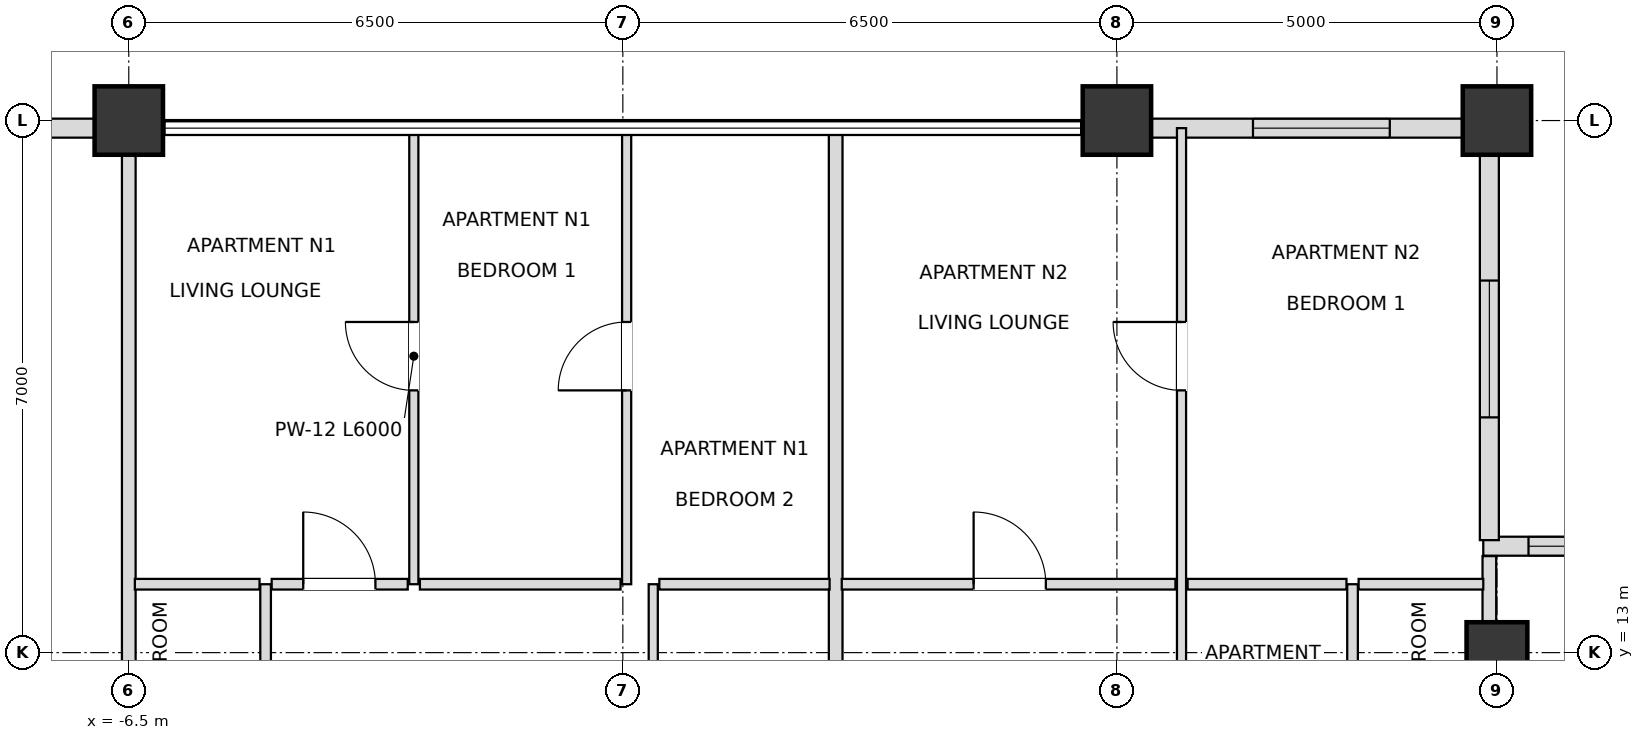
"""IFC4 building model, lengths in metres.
Left out: names, types, materials, properties, quantities, classifications, styles, units other than length and angle.
Written with IfcOpenShell. Run it as: python <this file> out.ifc"""

import sys

from ifc_helpers import new_model, si_unit, direction, frame, frame_2d, origin, origin_2d, place, context, subcontext, project, spatial, rectangle, extrude, element, fill, save


model = new_model("IFC4")
c1 = context("Model", 3, precision=1e-05, world=origin(), true_north=direction((0.0, 1.0)))
c2 = subcontext(c1, "Body", "Model", "MODEL_VIEW")
j1 = project(units=[si_unit("LENGTHUNIT", "METRE"), si_unit("PLANEANGLEUNIT", "RADIAN")], contexts=[c1])
p1 = place(None, origin())
s1 = spatial("IfcSite", under=j1, at=p1, CompositionType="ELEMENT")
p2 = place(p1, origin())
s2 = spatial("IfcBuilding", under=s1, at=p2, CompositionType="ELEMENT")
p3 = place(p2, frame((0.0, 0.0, 233.1)))
s3 = spatial("IfcBuildingStorey", under=s2, at=p3, CompositionType="ELEMENT", Elevation=233.1)
for number, where, z_axis, x_axis in (
    (1, (11.5, 20.0, 0.0), (0.0, 0.0, 1.0), (1.0, 0.0, 0.0)),
    (2, (6.5, 20.0, 0.0), (0.0, 0.0, 1.0), (1.0, 0.0, 0.0)),
    (3, (-6.5, 20.0, 0.0), (0.0, 0.0, 1.0), (1.0, 0.0, 0.0)),
):
    element("IfcColumn", number, at=place(p3, frame(where, z_axis=z_axis, x_axis=x_axis)), inside=s3, PredefinedType="USERDEFINED", context=c2, shape_type="SweptSolid", body=[
        extrude(rectangle(XDim=0.9, YDim=0.9, at=origin_2d()), origin(), (0.0, 0.0, 1.0), 3.6),
    ])
p4 = place(p3, frame((11.5, 13.0, 0.0), z_axis=(0.0, 0.0, 1.0), x_axis=(1.0, 0.0, 0.0)))
e4 = element("IfcColumn", 4, at=p4, inside=s3, PredefinedType="COLUMN", context=c2, shape_type="SweptSolid", body=[
    extrude(rectangle(XDim=0.8, YDim=0.8, at=origin_2d()), origin(), (0.0, 0.0, 1.0), 3.6),
])
p5 = place(p3, frame((11.055, 19.9, 0.0), z_axis=(0.0, 0.0, 1.0), x_axis=(-1.0, 0.0, 0.0)))
e5 = element("IfcWall", 5, at=p5, inside=s3, PredefinedType="SOLIDWALL", context=c2, shape_type="SweptSolid", body=[
    extrude(rectangle(XDim=4.11, YDim=0.25, at=frame_2d((2.055, 0.0))), origin(), (0.0, 0.0, 1.0), 2.748),
])
p6 = place(p5, frame((0.965, 0.0, 0.72)))
e6 = element("IfcOpeningElement", 6, at=p6, cuts=e5, PredefinedType="OPENING", context=c2, shape_type="SweptSolid", body=[
    extrude(rectangle(XDim=1.8, YDim=1.68, at=frame_2d((0.9, 0.84))), frame((0.0, 0.135, 0.0), z_axis=(0.0, -1.0, 0.0), x_axis=(1.0, 0.0, 0.0)), (0.0, 0.0, 1.0), 0.27),
])
p7 = place(p3, frame((-6.945, 19.9, 0.0), z_axis=(0.0, 0.0, 1.0), x_axis=(-1.0, 0.0, 0.0)))
e7 = element("IfcWall", 7, at=p7, inside=s3, PredefinedType="SOLIDWALL", context=c2, shape_type="SweptSolid", body=[
    extrude(rectangle(XDim=4.11, YDim=0.25, at=frame_2d((2.055, 0.0))), origin(), (0.0, 0.0, 1.0), 2.748),
])
p8 = place(p7, frame((1.155, 0.0, 0.72)))
e8 = element("IfcOpeningElement", 8, at=p8, cuts=e7, PredefinedType="OPENING", context=c2, shape_type="SweptSolid", body=[
    extrude(rectangle(XDim=1.8, YDim=1.68, at=frame_2d((0.9, 0.84))), frame((0.0, 0.135, 0.0), z_axis=(0.0, -1.0, 0.0), x_axis=(1.0, 0.0, 0.0)), (0.0, 0.0, 1.0), 0.27),
])
p9 = place(p3, frame((16.98, 14.4, 0.0), z_axis=(0.0, 0.0, 1.0), x_axis=(-1.0, 0.0, 0.0)))
e9 = element("IfcWall", 9, at=p9, inside=s3, PredefinedType="SOLIDWALL", context=c2, shape_type="SweptSolid", body=[
    extrude(rectangle(XDim=5.66, YDim=0.25, at=frame_2d((2.83, 0.0))), origin(), (0.0, 0.0, 1.0), 2.748),
])
p10 = place(p9, frame((0.595, 0.0, 0.72)))
e10 = element("IfcOpeningElement", 10, at=p10, cuts=e9, PredefinedType="OPENING", context=c2, shape_type="SweptSolid", body=[
    extrude(rectangle(XDim=1.8, YDim=1.68, at=frame_2d((0.9, 0.84))), frame((0.0, 0.135, 0.0), z_axis=(0.0, -1.0, 0.0), x_axis=(1.0, 0.0, 0.0)), (0.0, 0.0, 1.0), 0.27),
])
p11 = place(p9, frame((3.265, 0.0, 0.72)))
e11 = element("IfcOpeningElement", 11, at=p11, cuts=e9, PredefinedType="OPENING", context=c2, shape_type="SweptSolid", body=[
    extrude(rectangle(XDim=1.8, YDim=1.68, at=frame_2d((0.9, 0.84))), frame((0.0, 0.135, 0.0), z_axis=(0.0, -1.0, 0.0), x_axis=(1.0, 0.0, 0.0)), (0.0, 0.0, 1.0), 0.27),
])
p12 = place(p3, frame((11.4, 14.48, 0.0), z_axis=(0.0, 0.0, 1.0), x_axis=(0.0, 1.0, 0.0)))
e12 = element("IfcWall", 12, at=p12, inside=s3, PredefinedType="SOLIDWALL", context=c2, shape_type="SweptSolid", body=[
    extrude(rectangle(XDim=5.34, YDim=0.25, at=frame_2d((2.67, 0.0))), origin(), (0.0, 0.0, 1.0), 2.748),
])
p13 = place(p12, frame((1.615, 0.0, 0.72)))
e13 = element("IfcOpeningElement", 13, at=p13, cuts=e12, PredefinedType="OPENING", context=c2, shape_type="SweptSolid", body=[
    extrude(rectangle(XDim=1.8, YDim=1.68, at=frame_2d((0.9, 0.84))), frame((0.0, 0.135, 0.0), z_axis=(0.0, -1.0, 0.0), x_axis=(1.0, 0.0, 0.0)), (0.0, 0.0, 1.0), 0.27),
])
p14 = place(p3, frame((-6.5, 9.2, 0.0), z_axis=(0.0, 0.0, 1.0), x_axis=(0.0, 1.0, 0.0)))
e14 = element("IfcWall", 14, at=p14, inside=s3, PredefinedType="PARTITIONING", context=c2, shape_type="SweptSolid", body=[
    extrude(rectangle(XDim=10.7, YDim=0.18, at=frame_2d((5.35, 0.0))), origin(), (0.0, 0.0, 1.0), 2.826),
])
p15 = place(p3, frame((-4.7, 9.2, 0.0), z_axis=(0.0, 0.0, 1.0), x_axis=(0.0, 1.0, 0.0)))
e15 = element("IfcWall", 15, at=p15, inside=s3, PredefinedType="PARTITIONING", context=c2, shape_type="SweptSolid", body=[
    extrude(rectangle(XDim=4.7, YDim=0.14, at=frame_2d((2.35, 0.0))), origin(), (0.0, 0.0, 1.0), 3.38),
])
p16 = place(p15, frame((1.9, 0.0, 0.0)))
e16 = element("IfcOpeningElement", 16, at=p16, cuts=e15, PredefinedType="OPENING", context=c2, shape_type="SweptSolid", body=[
    extrude(rectangle(XDim=0.9, YDim=2.1, at=frame_2d((0.45, 1.05))), frame((0.0, 0.08, 0.0), z_axis=(0.0, -1.0, 0.0), x_axis=(1.0, 0.0, 0.0)), (0.0, 0.0, 1.0), 0.16),
])
p17 = place(p3, frame((-2.75, 13.9, 0.0), z_axis=(0.0, 0.0, 1.0), x_axis=(0.0, 1.0, 0.0)))
e17 = element("IfcWall", 17, at=p17, inside=s3, PredefinedType="PARTITIONING", context=c2, shape_type="SweptSolid", body=[
    extrude(rectangle(XDim=6.0, YDim=0.12, at=frame_2d((3.0, 0.0))), origin(), (0.0, 0.0, 1.0), 3.018),
])
p18 = place(p17, frame((2.55, 0.0, 0.0)))
e18 = element("IfcOpeningElement", 18, at=p18, cuts=e17, PredefinedType="OPENING", context=c2, shape_type="SweptSolid", body=[
    extrude(rectangle(XDim=0.9, YDim=2.1, at=frame_2d((0.45, 1.05))), frame((0.0, 0.07, 0.0), z_axis=(0.0, -1.0, 0.0), x_axis=(1.0, 0.0, 0.0)), (0.0, 0.0, 1.0), 0.14),
])
p19 = place(p3, frame((0.05, 13.9, 0.0), z_axis=(0.0, 0.0, 1.0), x_axis=(0.0, 1.0, 0.0)))
e19 = element("IfcWall", 19, at=p19, inside=s3, PredefinedType="PARTITIONING", context=c2, shape_type="SweptSolid", body=[
    extrude(rectangle(XDim=6.0, YDim=0.12, at=frame_2d((3.0, 0.0))), origin(), (0.0, 0.0, 1.0), 3.018),
])
p20 = place(p19, frame((2.55, 0.0, 0.0)))
e20 = element("IfcOpeningElement", 20, at=p20, cuts=e19, PredefinedType="OPENING", context=c2, shape_type="SweptSolid", body=[
    extrude(rectangle(XDim=0.9, YDim=2.1, at=frame_2d((0.45, 1.05))), frame((0.0, 0.07, 0.0), z_axis=(0.0, -1.0, 0.0), x_axis=(1.0, 0.0, 0.0)), (0.0, 0.0, 1.0), 0.14),
])
p21 = place(p3, frame((0.4, 9.2, 0.0), z_axis=(0.0, 0.0, 1.0), x_axis=(0.0, 1.0, 0.0)))
e21 = element("IfcWall", 21, at=p21, inside=s3, PredefinedType="PARTITIONING", context=c2, shape_type="SweptSolid", body=[
    extrude(rectangle(XDim=4.7, YDim=0.12, at=frame_2d((2.35, 0.0))), origin(), (0.0, 0.0, 1.0), 3.38),
])
p22 = place(p21, frame((1.875, 0.0, 0.0)))
e22 = element("IfcOpeningElement", 22, at=p22, cuts=e21, PredefinedType="OPENING", context=c2, shape_type="SweptSolid", body=[
    extrude(rectangle(XDim=0.95, YDim=2.1, at=frame_2d((0.475, 1.05))), frame((0.0, 0.07, 0.0), z_axis=(0.0, -1.0, 0.0), x_axis=(1.0, 0.0, 0.0)), (0.0, 0.0, 1.0), 0.14),
])
p23 = place(p3, frame((2.8, 9.2, 0.0), z_axis=(0.0, 0.0, 1.0), x_axis=(0.0, 1.0, 0.0)))
e23 = element("IfcWall", 23, at=p23, inside=s3, PredefinedType="PARTITIONING", context=c2, shape_type="SweptSolid", body=[
    extrude(rectangle(XDim=10.7, YDim=0.18, at=frame_2d((5.35, 0.0))), origin(), (0.0, 0.0, 1.0), 3.018),
])
p24 = place(p3, frame((7.35, 9.2, 0.0), z_axis=(0.0, 0.0, 1.0), x_axis=(0.0, 1.0, 0.0)))
e24 = element("IfcWall", 24, at=p24, inside=s3, PredefinedType="PARTITIONING", context=c2, shape_type="SweptSolid", body=[
    extrude(rectangle(XDim=10.7, YDim=0.12, at=frame_2d((5.35, 0.0))), origin(), (0.0, 0.0, 1.0), 2.826),
])
p25 = place(p24, frame((1.875, 0.0, 0.0)))
e25 = element("IfcOpeningElement", 25, at=p25, cuts=e24, PredefinedType="OPENING", context=c2, shape_type="SweptSolid", body=[
    extrude(rectangle(XDim=0.95, YDim=2.1, at=frame_2d((0.475, 1.05))), frame((0.0, 0.07, 0.0), z_axis=(0.0, -1.0, 0.0), x_axis=(1.0, 0.0, 0.0)), (0.0, 0.0, 1.0), 0.14),
])
p26 = place(p24, frame((7.25, 0.0, 0.0)))
e26 = element("IfcOpeningElement", 26, at=p26, cuts=e24, PredefinedType="OPENING", context=c2, shape_type="SweptSolid", body=[
    extrude(rectangle(XDim=0.9, YDim=2.1, at=frame_2d((0.45, 1.05))), frame((0.0, 0.07, 0.0), z_axis=(0.0, -1.0, 0.0), x_axis=(1.0, 0.0, 0.0)), (0.0, 0.0, 1.0), 0.14),
])
p27 = place(p3, frame((9.6, 9.2, 0.0), z_axis=(0.0, 0.0, 1.0), x_axis=(0.0, 1.0, 0.0)))
e27 = element("IfcWall", 27, at=p27, inside=s3, PredefinedType="PARTITIONING", context=c2, shape_type="SweptSolid", body=[
    extrude(rectangle(XDim=4.7, YDim=0.14, at=frame_2d((2.35, 0.0))), origin(), (0.0, 0.0, 1.0), 2.826),
])
p28 = place(p27, frame((1.9, 0.0, 0.0)))
e28 = element("IfcOpeningElement", 28, at=p28, cuts=e27, PredefinedType="OPENING", context=c2, shape_type="SweptSolid", body=[
    extrude(rectangle(XDim=0.9, YDim=2.1, at=frame_2d((0.45, 1.05))), frame((0.0, 0.08, 0.0), z_axis=(0.0, -1.0, 0.0), x_axis=(1.0, 0.0, 0.0)), (0.0, 0.0, 1.0), 0.16),
])
p29 = place(p3, frame((11.4, 9.2, 0.0), z_axis=(0.0, 0.0, 1.0), x_axis=(0.0, 1.0, 0.0)))
e29 = element("IfcWall", 29, at=p29, inside=s3, PredefinedType="PARTITIONING", context=c2, shape_type="SweptSolid", body=[
    extrude(rectangle(XDim=5.07, YDim=0.18, at=frame_2d((2.535, 0.0))), origin(), (0.0, 0.0, 1.0), 2.748),
])
p30 = place(p3, frame((-6.42, 13.9, 0.0), z_axis=(0.0, 0.0, 1.0), x_axis=(1.0, 0.0, 0.0)))
e30 = element("IfcWall", 30, at=p30, inside=s3, PredefinedType="PARTITIONING", context=c2, shape_type="SweptSolid", body=[
    extrude(rectangle(XDim=1.64, YDim=0.14, at=frame_2d((0.82, 0.0))), origin(), (0.0, 0.0, 1.0), 3.38),
])
p31 = place(p3, frame((-4.62, 13.9, 0.0), z_axis=(0.0, 0.0, 1.0), x_axis=(1.0, 0.0, 0.0)))
e31 = element("IfcWall", 31, at=p31, inside=s3, PredefinedType="PARTITIONING", context=c2, shape_type="SweptSolid", body=[
    extrude(rectangle(XDim=1.79, YDim=0.14, at=frame_2d((0.895, 0.0))), origin(), (0.0, 0.0, 1.0), 3.38),
])
p32 = place(p31, frame((0.415, 0.0, 0.0)))
e32 = element("IfcOpeningElement", 32, at=p32, cuts=e31, PredefinedType="OPENING", context=c2, shape_type="SweptSolid", body=[
    extrude(rectangle(XDim=0.95, YDim=2.1, at=frame_2d((0.475, 1.05))), frame((0.0, 0.08, 0.0), z_axis=(0.0, -1.0, 0.0), x_axis=(1.0, 0.0, 0.0)), (0.0, 0.0, 1.0), 0.16),
])
p33 = place(p3, frame((-2.67, 13.9, 0.0), z_axis=(0.0, 0.0, 1.0), x_axis=(1.0, 0.0, 0.0)))
e33 = element("IfcWall", 33, at=p33, inside=s3, PredefinedType="PARTITIONING", context=c2, shape_type="SweptSolid", body=[
    extrude(rectangle(XDim=2.64, YDim=0.14, at=frame_2d((1.32, 0.0))), origin(), (0.0, 0.0, 1.0), 3.38),
])
p34 = place(p3, frame((0.48, 13.9, 0.0), z_axis=(0.0, 0.0, 1.0), x_axis=(1.0, 0.0, 0.0)))
e34 = element("IfcWall", 34, at=p34, inside=s3, PredefinedType="PARTITIONING", context=c2, shape_type="SweptSolid", body=[
    extrude(rectangle(XDim=2.24, YDim=0.14, at=frame_2d((1.12, 0.0))), origin(), (0.0, 0.0, 1.0), 3.38),
])
p35 = place(p3, frame((2.88, 13.9, 0.0), z_axis=(0.0, 0.0, 1.0), x_axis=(1.0, 0.0, 0.0)))
e35 = element("IfcWall", 35, at=p35, inside=s3, PredefinedType="PARTITIONING", context=c2, shape_type="SweptSolid", body=[
    extrude(rectangle(XDim=4.39, YDim=0.14, at=frame_2d((2.195, 0.0))), origin(), (0.0, 0.0, 1.0), 2.826),
])
p36 = place(p35, frame((1.735, 0.0, 0.0)))
e36 = element("IfcOpeningElement", 36, at=p36, cuts=e35, PredefinedType="OPENING", context=c2, shape_type="SweptSolid", body=[
    extrude(rectangle(XDim=0.95, YDim=2.1, at=frame_2d((0.475, 1.05))), frame((0.0, 0.08, 0.0), z_axis=(0.0, -1.0, 0.0), x_axis=(1.0, 0.0, 0.0)), (0.0, 0.0, 1.0), 0.16),
])
p37 = place(p3, frame((7.43, 13.9, 0.0), z_axis=(0.0, 0.0, 1.0), x_axis=(1.0, 0.0, 0.0)))
e37 = element("IfcWall", 37, at=p37, inside=s3, PredefinedType="PARTITIONING", context=c2, shape_type="SweptSolid", body=[
    extrude(rectangle(XDim=2.09, YDim=0.14, at=frame_2d((1.045, 0.0))), origin(), (0.0, 0.0, 1.0), 3.38),
])
p38 = place(p3, frame((9.68, 13.9, 0.0), z_axis=(0.0, 0.0, 1.0), x_axis=(1.0, 0.0, 0.0)))
e38 = element("IfcWall", 38, at=p38, inside=s3, PredefinedType="PARTITIONING", context=c2, shape_type="SweptSolid", body=[
    extrude(rectangle(XDim=1.64, YDim=0.14, at=frame_2d((0.82, 0.0))), origin(), (0.0, 0.0, 1.0), 3.38),
])
p39 = place(p6, origin())
e39 = element("IfcWindow", 39, at=p39, inside=s3, PartitioningType="SINGLE_PANEL", PredefinedType="WINDOW", context=c2, shape_type="SweptSolid", body=[
    extrude(rectangle(XDim=1.8, YDim=1.68, at=frame_2d((0.9, 0.84))), frame((0.0, 0.03, 0.0), z_axis=(0.0, -1.0, 0.0), x_axis=(1.0, 0.0, 0.0)), (0.0, 0.0, 1.0), 0.06),
])
fill(e6, e39)
p40 = place(p11, origin())
e40 = element("IfcWindow", 40, at=p40, inside=s3, PartitioningType="SINGLE_PANEL", PredefinedType="WINDOW", context=c2, shape_type="SweptSolid", body=[
    extrude(rectangle(XDim=1.8, YDim=1.68, at=frame_2d((0.9, 0.84))), frame((0.0, 0.03, 0.0), z_axis=(0.0, -1.0, 0.0), x_axis=(1.0, 0.0, 0.0)), (0.0, 0.0, 1.0), 0.06),
])
fill(e11, e40)
p41 = place(p13, origin())
e41 = element("IfcWindow", 41, at=p41, inside=s3, PartitioningType="SINGLE_PANEL", PredefinedType="WINDOW", context=c2, shape_type="SweptSolid", body=[
    extrude(rectangle(XDim=1.8, YDim=1.68, at=frame_2d((0.9, 0.84))), frame((0.0, 0.03, 0.0), z_axis=(0.0, -1.0, 0.0), x_axis=(1.0, 0.0, 0.0)), (0.0, 0.0, 1.0), 0.06),
])
fill(e13, e41)
p42 = place(p32, origin())
e42 = element("IfcDoor", 42, at=p42, inside=s3, OperationType="SINGLE_SWING_LEFT", PredefinedType="DOOR", context=c2, shape_type="SweptSolid", body=[
    extrude(rectangle(XDim=0.95, YDim=2.1, at=frame_2d((0.475, 1.05))), frame((0.0, 0.025, 0.0), z_axis=(0.0, -1.0, 0.0), x_axis=(1.0, 0.0, 0.0)), (0.0, 0.0, 1.0), 0.05),
])
fill(e32, e42)
p43 = place(p18, origin())
e43 = element("IfcDoor", 43, at=p43, inside=s3, OperationType="SINGLE_SWING_RIGHT", PredefinedType="DOOR", context=c2, shape_type="SweptSolid", body=[
    extrude(rectangle(XDim=0.9, YDim=2.1, at=frame_2d((0.45, 1.05))), frame((0.0, 0.025, 0.0), z_axis=(0.0, -1.0, 0.0), x_axis=(1.0, 0.0, 0.0)), (0.0, 0.0, 1.0), 0.05),
])
fill(e18, e43)
p44 = place(p20, origin())
e44 = element("IfcDoor", 44, at=p44, inside=s3, OperationType="SINGLE_SWING_LEFT", PredefinedType="DOOR", context=c2, shape_type="SweptSolid", body=[
    extrude(rectangle(XDim=0.9, YDim=2.1, at=frame_2d((0.45, 1.05))), frame((0.0, 0.025, 0.0), z_axis=(0.0, -1.0, 0.0), x_axis=(1.0, 0.0, 0.0)), (0.0, 0.0, 1.0), 0.05),
])
fill(e20, e44)
p45 = place(p36, origin())
e45 = element("IfcDoor", 45, at=p45, inside=s3, OperationType="SINGLE_SWING_LEFT", PredefinedType="DOOR", context=c2, shape_type="SweptSolid", body=[
    extrude(rectangle(XDim=0.95, YDim=2.1, at=frame_2d((0.475, 1.05))), frame((0.0, 0.025, 0.0), z_axis=(0.0, -1.0, 0.0), x_axis=(1.0, 0.0, 0.0)), (0.0, 0.0, 1.0), 0.05),
])
fill(e36, e45)
p46 = place(p26, origin())
e46 = element("IfcDoor", 46, at=p46, inside=s3, OperationType="SINGLE_SWING_RIGHT", PredefinedType="DOOR", context=c2, shape_type="SweptSolid", body=[
    extrude(rectangle(XDim=0.9, YDim=2.1, at=frame_2d((0.45, 1.05))), frame((0.0, 0.025, 0.0), z_axis=(0.0, -1.0, 0.0), x_axis=(1.0, 0.0, 0.0)), (0.0, 0.0, 1.0), 0.05),
])
fill(e26, e46)
save(model, sys.argv[1])
